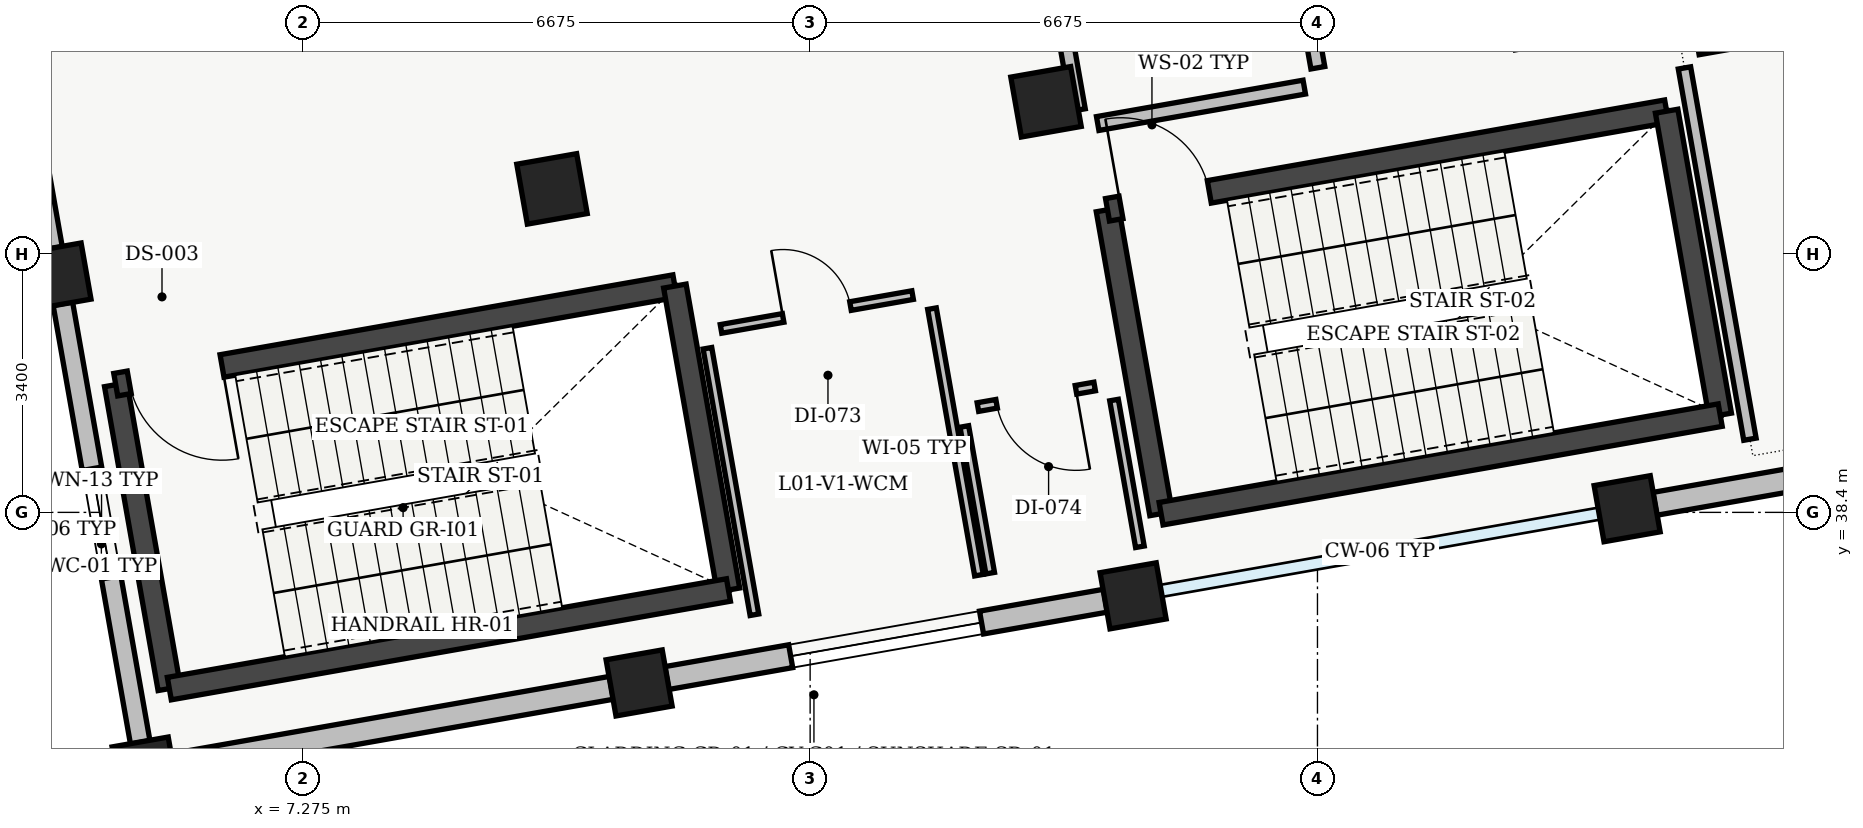
"""IFC4 building model, lengths in metres.
Left out: names, types, materials, properties, quantities, classifications, styles, units other than length and angle.
Written with IfcOpenShell. Run it as: python <this file> out.ifc"""

import sys

from ifc_helpers import new_model, si_unit, direction, frame, frame_2d, origin, origin_2d, place, context, subcontext, project, spatial, rectangle, extrude, element, fill, save


model = new_model("IFC4")
c1 = context("Model", 3, precision=1e-05, world=origin(), true_north=direction((0.0, 1.0)))
c2 = subcontext(c1, "Body", "Model", "MODEL_VIEW")
j1 = project(units=[si_unit("LENGTHUNIT", "METRE"), si_unit("PLANEANGLEUNIT", "RADIAN")], contexts=[c1])
p1 = place(None, origin())
s1 = spatial("IfcSite", under=j1, at=p1, CompositionType="ELEMENT")
p2 = place(p1, origin())
s2 = spatial("IfcBuilding", under=s1, at=p2, CompositionType="ELEMENT")
p3 = place(p2, frame((0.0, 0.0, 5.1)))
s3 = spatial("IfcBuildingStorey", under=s2, at=p3, CompositionType="ELEMENT", Elevation=5.1)
for number, where, z_axis, x_axis in (
    (1, (5.2, 35.01, 0.0), (0.0, 0.0, 1.0), (0.985, 0.174, 0.0)),
    (2, (4.054, 41.51, 0.0), (0.0, 0.0, 1.0), (0.985, 0.174, 0.0)),
    (3, (11.7, 36.156, 0.0), (0.0, 0.0, 1.0), (0.985, 0.174, 0.0)),
):
    element("IfcColumn", number, at=place(p3, frame(where, z_axis=z_axis, x_axis=x_axis)), inside=s3, PredefinedType="COLUMN", context=c2, shape_type="SweptSolid", body=[
        extrude(rectangle(XDim=0.75, YDim=0.75, at=origin_2d()), origin(), (0.0, 0.0, 1.0), 4.31),
    ])
p4 = place(p3, frame((10.554, 42.656, 0.0), z_axis=(0.0, 0.0, 1.0), x_axis=(0.984807753012, 0.173648177667, 0.0)))
e4 = element("IfcColumn", 4, at=p4, inside=s3, PredefinedType="COLUMN", context=c2, shape_type="SweptSolid", body=[
    extrude(rectangle(XDim=0.8, YDim=0.8, at=origin_2d()), origin(), (0.0, 0.0, 1.0), 4.31),
])
p5 = place(p3, frame((18.199, 37.302, 0.0), z_axis=(0.0, 0.0, 1.0), x_axis=(0.984807753012, 0.173648177667, 0.0)))
e5 = element("IfcColumn", 5, at=p5, inside=s3, PredefinedType="COLUMN", context=c2, shape_type="SweptSolid", body=[
    extrude(rectangle(XDim=0.75, YDim=0.75, at=origin_2d()), origin(), (0.0, 0.0, 1.0), 4.31),
])
p6 = place(p3, frame((17.053, 43.802, 0.0), z_axis=(0.0, 0.0, 1.0), x_axis=(0.984807753012, 0.173648177667, 0.0)))
e6 = element("IfcColumn", 6, at=p6, inside=s3, PredefinedType="COLUMN", context=c2, shape_type="SweptSolid", body=[
    extrude(rectangle(XDim=0.8, YDim=0.8, at=origin_2d()), origin(), (0.0, 0.0, 1.0), 4.31),
])
p7 = place(p3, frame((24.699, 38.448, 0.0), z_axis=(0.0, 0.0, 1.0), x_axis=(0.984807753012, 0.173648177667, 0.0)))
e7 = element("IfcColumn", 7, at=p7, inside=s3, PredefinedType="COLUMN", context=c2, shape_type="SweptSolid", body=[
    extrude(rectangle(XDim=0.75, YDim=0.75, at=origin_2d()), origin(), (0.0, 0.0, 1.0), 4.31),
])
p8 = place(p3, frame((5.136, 35.374, 0.0), z_axis=(0.0, 0.0, 1.0), x_axis=(-0.1736474839, 0.984807875342, 0.0)))
e8 = element("IfcWall", 8, at=p8, inside=s3, PredefinedType="STANDARD", context=c2, shape_type="SweptSolid", body=[
    extrude(rectangle(XDim=5.86, YDim=0.26, at=frame_2d((2.93, 0.0))), origin(), (0.0, 0.0, 1.0), 3.795),
])
p9 = place(p8, frame((2.205, 0.0, 0.95)))
e9 = element("IfcOpeningElement", 9, at=p9, cuts=e8, PredefinedType="OPENING", context=c2, shape_type="SweptSolid", body=[
    extrude(rectangle(XDim=1.45, YDim=1.35, at=frame_2d((0.725, 0.675))), frame((0.0, 0.13, 0.0), z_axis=(0.0, -1.0, 0.0), x_axis=(1.0, 0.0, 0.0)), (0.0, 0.0, 1.0), 0.26),
])
p10 = place(p3, frame((3.99, 41.874, 0.0), z_axis=(0.0, 0.0, 1.0), x_axis=(-0.1736474839, 0.984807875342, 0.0)))
e10 = element("IfcWall", 10, at=p10, inside=s3, PredefinedType="STANDARD", context=c2, shape_type="SweptSolid", body=[
    extrude(rectangle(XDim=5.86, YDim=0.245, at=frame_2d((2.93, 0.0))), origin(), (0.0, 0.0, 1.0), 3.795),
])
p11 = place(p10, frame((1.805, 0.0, 0.95)))
e11 = element("IfcOpeningElement", 11, at=p11, cuts=e10, PredefinedType="OPENING", context=c2, shape_type="SweptSolid", body=[
    extrude(rectangle(XDim=2.25, YDim=1.55, at=frame_2d((1.125, 0.775))), frame((0.0, 0.123, 0.0), z_axis=(0.0, -1.0, 0.0), x_axis=(1.0, 0.0, 0.0)), (0.0, 0.0, 1.0), 0.245),
])
p12 = place(p3, frame((30.834, 39.53, 0.0), z_axis=(0.0, 0.0, 1.0), x_axis=(-0.984807875342, -0.1736474839, 0.0)))
e12 = element("IfcWall", 12, at=p12, inside=s3, PredefinedType="STANDARD", context=c2, shape_type="SweptSolid", body=[
    extrude(rectangle(XDim=5.86, YDim=0.305, at=frame_2d((2.93, 0.0))), origin(), (0.0, 0.0, 1.0), 3.795),
])
p13 = place(p12, frame((2.08, 0.0, 0.95)))
e13 = element("IfcOpeningElement", 13, at=p13, cuts=e12, PredefinedType="OPENING", context=c2, shape_type="SweptSolid", body=[
    extrude(rectangle(XDim=1.7, YDim=1.55, at=frame_2d((0.85, 0.775))), frame((0.0, 0.152, 0.0), z_axis=(0.0, -1.0, 0.0), x_axis=(1.0, 0.0, 0.0)), (0.0, 0.0, 1.0), 0.305),
])
p14 = place(p3, frame((17.835, 37.238, 0.0), z_axis=(0.0, 0.0, 1.0), x_axis=(-0.98480661901, -0.173654608793, 0.0)))
e14 = element("IfcWall", 14, at=p14, inside=s3, PredefinedType="STANDARD", context=c2, shape_type="SweptSolid", body=[
    extrude(rectangle(XDim=5.86, YDim=0.305, at=frame_2d((2.93, 0.0))), origin(), (0.0, 0.0, 1.0), 3.795),
])
p15 = place(p14, frame((1.655, 0.0, 0.95)))
e15 = element("IfcOpeningElement", 15, at=p15, cuts=e14, PredefinedType="OPENING", context=c2, shape_type="SweptSolid", body=[
    extrude(rectangle(XDim=2.55, YDim=1.75, at=frame_2d((1.275, 0.875))), frame((0.0, 0.152, 0.0), z_axis=(0.0, -1.0, 0.0), x_axis=(1.0, 0.0, 0.0)), (0.0, 0.0, 1.0), 0.305),
])
p16 = place(p3, frame((11.335, 36.092, 0.0), z_axis=(0.0, 0.0, 1.0), x_axis=(-0.984807875342, -0.1736474839, 0.0)))
e16 = element("IfcWall", 16, at=p16, inside=s3, PredefinedType="STANDARD", context=c2, shape_type="SweptSolid", body=[
    extrude(rectangle(XDim=5.86, YDim=0.305, at=frame_2d((2.93, 0.0))), origin(), (0.0, 0.0, 1.0), 3.795),
])
p17 = place(p3, frame((5.519, 36.082, 0.0), z_axis=(0.0, 0.0, 1.0), x_axis=(-0.173665267602, 0.984804739443, 0.0)))
e17 = element("IfcWall", 17, at=p17, inside=s3, PredefinedType="SHEAR", context=c2, shape_type="SweptSolid", body=[
    extrude(rectangle(XDim=4.06, YDim=0.3, at=frame_2d((2.03, 0.0))), origin(), (0.0, 0.0, 1.0), 4.28),
])
p18 = place(p3, frame((4.814, 40.08, 0.0), z_axis=(0.0, 0.0, 1.0), x_axis=(0.984802636214, 0.173677193974, 0.0)))
e18 = element("IfcWall", 18, at=p18, inside=s3, PredefinedType="SHEAR", context=c2, shape_type="SweptSolid", body=[
    extrude(rectangle(XDim=7.47, YDim=0.3, at=frame_2d((3.735, 0.0))), origin(), (0.0, 0.0, 1.0), 4.28),
])
p19 = place(p18, frame((0.18, 0.0, 0.0)))
e19 = element("IfcOpeningElement", 19, at=p19, cuts=e18, PredefinedType="OPENING", context=c2, shape_type="SweptSolid", body=[
    extrude(rectangle(XDim=1.24, YDim=2.15, at=frame_2d((0.62, 1.075))), frame((0.0, 0.15, 0.0), z_axis=(0.0, -1.0, 0.0), x_axis=(1.0, 0.0, 0.0)), (0.0, 0.0, 1.0), 0.3),
])
p20 = place(p3, frame((12.17, 41.377, 0.0), z_axis=(0.0, 0.0, 1.0), x_axis=(0.173654983803, -0.984806552883, 0.0)))
e20 = element("IfcWall", 20, at=p20, inside=s3, PredefinedType="SHEAR", context=c2, shape_type="SweptSolid", body=[
    extrude(rectangle(XDim=4.06, YDim=0.3, at=frame_2d((2.03, 0.0))), origin(), (0.0, 0.0, 1.0), 4.28),
])
p21 = place(p3, frame((12.875, 37.379, 0.0), z_axis=(0.0, 0.0, 1.0), x_axis=(-0.984808225754, -0.173645496596, 0.0)))
e21 = element("IfcWall", 21, at=p21, inside=s3, PredefinedType="SHEAR", context=c2, shape_type="SweptSolid", body=[
    extrude(rectangle(XDim=7.47, YDim=0.3, at=frame_2d((3.735, 0.0))), origin(), (0.0, 0.0, 1.0), 4.28),
])
p22 = place(p3, frame((18.567, 38.383, 0.0), z_axis=(0.0, 0.0, 1.0), x_axis=(-0.173606946886, 0.984815022221, 0.0)))
e22 = element("IfcWall", 22, at=p22, inside=s3, PredefinedType="SHEAR", context=c2, shape_type="SweptSolid", body=[
    extrude(rectangle(XDim=4.06, YDim=0.3, at=frame_2d((2.03, 0.0))), origin(), (0.0, 0.0, 1.0), 4.28),
])
p23 = place(p3, frame((17.863, 42.381, 0.0), z_axis=(0.0, 0.0, 1.0), x_axis=(0.984808225754, 0.173645496596, 0.0)))
e23 = element("IfcWall", 23, at=p23, inside=s3, PredefinedType="SHEAR", context=c2, shape_type="SweptSolid", body=[
    extrude(rectangle(XDim=7.47, YDim=0.3, at=frame_2d((3.735, 0.0))), origin(), (0.0, 0.0, 1.0), 4.28),
])
p24 = place(p23, frame((0.18, 0.0, 0.0)))
e24 = element("IfcOpeningElement", 24, at=p24, cuts=e23, PredefinedType="OPENING", context=c2, shape_type="SweptSolid", body=[
    extrude(rectangle(XDim=1.18, YDim=2.15, at=frame_2d((0.59, 1.075))), frame((0.0, 0.15, 0.0), z_axis=(0.0, -1.0, 0.0), x_axis=(1.0, 0.0, 0.0)), (0.0, 0.0, 1.0), 0.3),
])
p25 = place(p3, frame((25.219, 43.678, 0.0), z_axis=(0.0, 0.0, 1.0), x_axis=(0.173665267602, -0.984804739443, 0.0)))
e25 = element("IfcWall", 25, at=p25, inside=s3, PredefinedType="SHEAR", context=c2, shape_type="SweptSolid", body=[
    extrude(rectangle(XDim=4.06, YDim=0.3, at=frame_2d((2.03, 0.0))), origin(), (0.0, 0.0, 1.0), 4.28),
])
p26 = place(p3, frame((25.924, 39.68, 0.0), z_axis=(0.0, 0.0, 1.0), x_axis=(-0.984809211193, -0.173639907711, 0.0)))
e26 = element("IfcWall", 26, at=p26, inside=s3, PredefinedType="SHEAR", context=c2, shape_type="SweptSolid", body=[
    extrude(rectangle(XDim=7.47, YDim=0.3, at=frame_2d((3.735, 0.0))), origin(), (0.0, 0.0, 1.0), 4.28),
])
p27 = place(p3, frame((17.733, 43.516, 0.0), z_axis=(0.0, 0.0, 1.0), x_axis=(0.984808483292, 0.173644035992, 0.0)))
e27 = element("IfcWall", 27, at=p27, inside=s3, PredefinedType="SOLIDWALL", context=c2, shape_type="SweptSolid", body=[
    extrude(rectangle(XDim=2.76, YDim=0.185, at=frame_2d((1.38, 0.0))), origin(), (0.0, 0.0, 1.0), 3.95),
])
p28 = place(p3, frame((20.63, 44.25, 0.0), z_axis=(0.0, 0.0, 1.0), x_axis=(-0.173621956536, 0.984812376145, 0.0)))
e28 = element("IfcWall", 28, at=p28, inside=s3, PredefinedType="SOLIDWALL", context=c2, shape_type="SweptSolid", body=[
    extrude(rectangle(XDim=3.41, YDim=0.185, at=frame_2d((1.705, 0.0))), origin(), (0.0, 0.0, 1.0), 3.95),
])
p29 = place(p28, frame((0.85, 0.0, 0.0)))
e29 = element("IfcOpeningElement", 29, at=p29, cuts=e28, PredefinedType="OPENING", context=c2, shape_type="SweptSolid", body=[
    extrude(rectangle(XDim=1.2, YDim=2.15, at=frame_2d((0.6, 1.075))), frame((0.0, 0.093, 0.0), z_axis=(0.0, -1.0, 0.0), x_axis=(1.0, 0.0, 0.0)), (0.0, 0.0, 1.0), 0.185),
])
p30 = place(p3, frame((16.886, 47.052, 0.0), z_axis=(0.0, 0.0, 1.0), x_axis=(0.173621956536, -0.984812376145, 0.0)))
e30 = element("IfcWall", 30, at=p30, inside=s3, PredefinedType="SOLIDWALL", context=c2, shape_type="SweptSolid", body=[
    extrude(rectangle(XDim=3.41, YDim=0.185, at=frame_2d((1.705, 0.0))), origin(), (0.0, 0.0, 1.0), 3.95),
])
p31 = place(p30, frame((1.36, 0.0, 0.0)))
e31 = element("IfcOpeningElement", 31, at=p31, cuts=e30, PredefinedType="OPENING", context=c2, shape_type="SweptSolid", body=[
    extrude(rectangle(XDim=1.2, YDim=2.15, at=frame_2d((0.6, 1.075))), frame((0.0, 0.093, 0.0), z_axis=(0.0, -1.0, 0.0), x_axis=(1.0, 0.0, 0.0)), (0.0, 0.0, 1.0), 0.185),
])
p32 = place(p3, frame((16.171, 37.574, 0.0), z_axis=(0.0, 0.0, 1.0), x_axis=(-0.173644490041, 0.984808403233, 0.0)))
e32 = element("IfcWall", 32, at=p32, inside=s3, PredefinedType="PARTITIONING", context=c2, shape_type="SweptSolid", body=[
    extrude(rectangle(XDim=3.56, YDim=0.115, at=frame_2d((1.78, 0.0))), origin(), (0.0, 0.0, 1.0), 3.95),
])
p33 = place(p3, frame((15.298, 41.259, 0.0), z_axis=(0.0, 0.0, 1.0), x_axis=(-0.984803714572, -0.17367107924, 0.0)))
e33 = element("IfcWall", 33, at=p33, inside=s3, PredefinedType="PARTITIONING", context=c2, shape_type="SweptSolid", body=[
    extrude(rectangle(XDim=2.56, YDim=0.115, at=frame_2d((1.28, 0.0))), origin(), (0.0, 0.0, 1.0), 3.95),
])
p34 = place(p33, frame((0.83, 0.0, 0.0)))
e34 = element("IfcOpeningElement", 34, at=p34, cuts=e33, PredefinedType="OPENING", context=c2, shape_type="SweptSolid", body=[
    extrude(rectangle(XDim=0.9, YDim=2.1, at=frame_2d((0.45, 1.05))), frame((0.0, 0.058, 0.0), z_axis=(0.0, -1.0, 0.0), x_axis=(1.0, 0.0, 0.0)), (0.0, 0.0, 1.0), 0.115),
])
p35 = place(p3, frame((12.599, 40.559, 0.0), z_axis=(0.0, 0.0, 1.0), x_axis=(0.173644490041, -0.984808403233, 0.0)))
e35 = element("IfcWall", 35, at=p35, inside=s3, PredefinedType="PARTITIONING", context=c2, shape_type="SweptSolid", body=[
    extrude(rectangle(XDim=3.56, YDim=0.115, at=frame_2d((1.78, 0.0))), origin(), (0.0, 0.0, 1.0), 3.95),
])
p36 = place(p3, frame((18.289, 37.948, 0.0), z_axis=(0.0, 0.0, 1.0), x_axis=(-0.173643211285, 0.984808628706, 0.0)))
e36 = element("IfcWall", 36, at=p36, inside=s3, PredefinedType="PARTITIONING", context=c2, shape_type="SweptSolid", body=[
    extrude(rectangle(XDim=1.96, YDim=0.115, at=frame_2d((0.98, 0.0))), origin(), (0.0, 0.0, 1.0), 3.645),
])
p37 = place(p3, frame((17.694, 40.056, 0.0), z_axis=(0.0, 0.0, 1.0), x_axis=(-0.984797734253, -0.173704987291, 0.0)))
e37 = element("IfcWall", 37, at=p37, inside=s3, PredefinedType="PARTITIONING", context=c2, shape_type="SweptSolid", body=[
    extrude(rectangle(XDim=1.56, YDim=0.115, at=frame_2d((0.78, 0.0))), origin(), (0.0, 0.0, 1.0), 3.95),
])
p38 = place(p37, frame((0.25, 0.0, 0.0)))
e38 = element("IfcOpeningElement", 38, at=p38, cuts=e37, PredefinedType="OPENING", context=c2, shape_type="SweptSolid", body=[
    extrude(rectangle(XDim=1.06, YDim=2.12, at=frame_2d((0.53, 1.06))), frame((0.0, 0.058, 0.0), z_axis=(0.0, -1.0, 0.0), x_axis=(1.0, 0.0, 0.0)), (0.0, 0.0, 1.0), 0.115),
])
p39 = place(p3, frame((15.979, 39.53, 0.0), z_axis=(0.0, 0.0, 1.0), x_axis=(0.173643211285, -0.984808628706, 0.0)))
e39 = element("IfcWall", 39, at=p39, inside=s3, PredefinedType="PARTITIONING", context=c2, shape_type="SweptSolid", body=[
    extrude(rectangle(XDim=1.96, YDim=0.115, at=frame_2d((0.98, 0.0))), origin(), (0.0, 0.0, 1.0), 3.95),
])
p40 = place(p3, frame((31.945, 45.615, 0.0), z_axis=(0.0, 0.0, 1.0), x_axis=(-0.984809620557, -0.173637585958, 0.0)))
e40 = element("IfcWall", 40, at=p40, inside=s3, PredefinedType="PARTITIONING", context=c2, shape_type="SweptSolid", body=[
    extrude(rectangle(XDim=6.41, YDim=0.165, at=frame_2d((3.205, 0.0))), origin(), (0.0, 0.0, 1.0), 3.95),
])
p41 = place(p40, frame((2.555, 0.0, 0.0)))
e41 = element("IfcOpeningElement", 41, at=p41, cuts=e40, PredefinedType="OPENING", context=c2, shape_type="SweptSolid", body=[
    extrude(rectangle(XDim=1.3, YDim=2.18, at=frame_2d((0.65, 1.09))), frame((0.0, 0.083, 0.0), z_axis=(0.0, -1.0, 0.0), x_axis=(1.0, 0.0, 0.0)), (0.0, 0.0, 1.0), 0.165),
])
p42 = place(p3, frame((25.454, 44.247, 0.0), z_axis=(0.0, 0.0, 1.0), x_axis=(0.173658971256, -0.98480584975, 0.0)))
e42 = element("IfcWall", 42, at=p42, inside=s3, PredefinedType="PARTITIONING", context=c2, shape_type="SweptSolid", body=[
    extrude(rectangle(XDim=4.96, YDim=0.165, at=frame_2d((2.48, 0.0))), origin(), (0.0, 0.0, 1.0), 3.95),
])
p43 = place(p9, origin())
e43 = element("IfcWindow", 43, at=p43, inside=s3, PartitioningType="SINGLE_PANEL", PredefinedType="WINDOW", context=c2, shape_type="SweptSolid", body=[
    extrude(rectangle(XDim=1.45, YDim=1.35, at=frame_2d((0.725, 0.675))), frame((0.0, 0.03, 0.0), z_axis=(0.0, -1.0, 0.0), x_axis=(1.0, 0.0, 0.0)), (0.0, 0.0, 1.0), 0.06),
])
fill(e9, e43)
p44 = place(p15, origin())
e44 = element("IfcWindow", 44, at=p44, inside=s3, PartitioningType="SINGLE_PANEL", PredefinedType="WINDOW", context=c2, shape_type="SweptSolid", body=[
    extrude(rectangle(XDim=2.55, YDim=1.75, at=frame_2d((1.275, 0.875))), frame((0.0, 0.03, 0.0), z_axis=(0.0, -1.0, 0.0), x_axis=(1.0, 0.0, 0.0)), (0.0, 0.0, 1.0), 0.06),
])
fill(e15, e44)
p45 = place(p19, origin())
e45 = element("IfcDoor", 45, at=p45, inside=s3, OperationType="SINGLE_SWING_RIGHT", PredefinedType="DOOR", context=c2, shape_type="SweptSolid", body=[
    extrude(rectangle(XDim=1.24, YDim=2.15, at=frame_2d((0.62, 1.075))), frame((0.0, 0.025, 0.0), z_axis=(0.0, -1.0, 0.0), x_axis=(1.0, 0.0, 0.0)), (0.0, 0.0, 1.0), 0.05),
])
fill(e19, e45)
p46 = place(p24, origin())
e46 = element("IfcDoor", 46, at=p46, inside=s3, OperationType="SINGLE_SWING_LEFT", PredefinedType="DOOR", context=c2, shape_type="SweptSolid", body=[
    extrude(rectangle(XDim=1.18, YDim=2.15, at=frame_2d((0.59, 1.075))), frame((0.0, 0.025, 0.0), z_axis=(0.0, -1.0, 0.0), x_axis=(1.0, 0.0, 0.0)), (0.0, 0.0, 1.0), 0.05),
])
fill(e24, e46)
p47 = place(p34, origin())
e47 = element("IfcDoor", 47, at=p47, inside=s3, OperationType="SINGLE_SWING_RIGHT", PredefinedType="DOOR", context=c2, shape_type="SweptSolid", body=[
    extrude(rectangle(XDim=0.9, YDim=2.1, at=frame_2d((0.45, 1.05))), frame((0.0, 0.025, 0.0), z_axis=(0.0, -1.0, 0.0), x_axis=(1.0, 0.0, 0.0)), (0.0, 0.0, 1.0), 0.05),
])
fill(e34, e47)
p48 = place(p38, origin())
e48 = element("IfcDoor", 48, at=p48, inside=s3, OperationType="SINGLE_SWING_LEFT", PredefinedType="DOOR", context=c2, shape_type="SweptSolid", body=[
    extrude(rectangle(XDim=1.06, YDim=2.12, at=frame_2d((0.53, 1.06))), frame((0.0, 0.025, 0.0), z_axis=(0.0, -1.0, 0.0), x_axis=(1.0, 0.0, 0.0)), (0.0, 0.0, 1.0), 0.05),
])
fill(e38, e48)
save(model, sys.argv[1])
